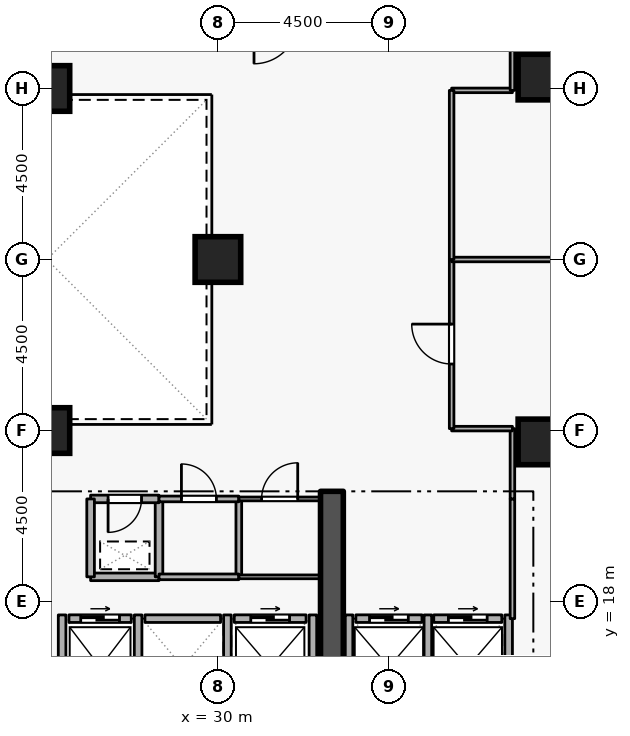
"""IFC4 building model, lengths in metres.
Left out: names, types, materials, properties, quantities, classifications, styles, units other than length and angle.
Written with IfcOpenShell. Run it as: python <this file> out.ifc"""

import sys

from ifc_helpers import new_model, si_unit, direction, frame, frame_2d, origin, origin_2d, place, context, subcontext, project, spatial, rectangle, extrude, element, fill, save


model = new_model("IFC4")
c1 = context("Model", 3, precision=1e-05, world=origin(), true_north=direction((0.0, 1.0)))
c2 = subcontext(c1, "Body", "Model", "MODEL_VIEW")
j1 = project(units=[si_unit("LENGTHUNIT", "METRE"), si_unit("PLANEANGLEUNIT", "RADIAN")], contexts=[c1])
p1 = place(None, origin())
s1 = spatial("IfcSite", under=j1, at=p1, CompositionType="ELEMENT")
p2 = place(p1, origin())
s2 = spatial("IfcBuilding", under=s1, at=p2, CompositionType="ELEMENT")
p3 = place(p2, frame((0.0, 0.0, 80.1)))
s3 = spatial("IfcBuildingStorey", under=s2, at=p3, CompositionType="ELEMENT", Elevation=80.1)
p4 = place(p3, frame((33.0, 15.2, 0.0), z_axis=(0.0, 0.0, 1.0), x_axis=(0.0, 1.0, 0.0)))
e1 = element("IfcWall", 1, at=p4, inside=s3, PredefinedType="SHEAR", context=c2, shape_type="SweptSolid", body=[
    extrude(rectangle(XDim=5.7, YDim=0.6, at=frame_2d((2.85, 0.0))), origin(), (0.0, 0.0, 1.0), 3.6),
])
for number, where, z_axis, x_axis in (
    (2, (38.5, 22.2, 0.0), (0.0, 0.0, 1.0), (1.0, 0.0, 0.0)),
    (3, (38.5, 31.8, 0.0), (0.0, 0.0, 1.0), (1.0, 0.0, 0.0)),
    (4, (25.5, 22.5, 0.0), (0.0, 0.0, 1.0), (1.0, 0.0, 0.0)),
    (5, (25.5, 31.5, 0.0), (0.0, 0.0, 1.0), (1.0, 0.0, 0.0)),
    (6, (30.0, 27.0, 0.0), (0.0, 0.0, 1.0), (1.0, 0.0, 0.0)),
):
    element("IfcColumn", number, at=place(p3, frame(where, z_axis=z_axis, x_axis=x_axis)), inside=s3, PredefinedType="COLUMN", context=c2, shape_type="SweptSolid", body=[
        extrude(rectangle(XDim=1.2, YDim=1.2, at=origin_2d()), origin(), (0.0, 0.0, 1.0), 3.6),
    ])
p5 = place(p3, frame((26.08, 17.55, 0.0), z_axis=(0.0, 0.0, 1.0), x_axis=(1.0, 0.0, 0.0)))
e7 = element("IfcWall", 7, at=p5, inside=s3, PredefinedType="STANDARD", context=c2, shape_type="SweptSolid", body=[
    extrude(rectangle(XDim=1.64, YDim=0.2, at=frame_2d((0.82, 0.0))), origin(), (0.0, 0.0, 1.0), 3.34),
])
p6 = place(p5, frame((0.31, 0.0, 0.0)))
e8 = element("IfcOpeningElement", 8, at=p6, cuts=e7, PredefinedType="OPENING", context=c2, shape_type="SweptSolid", body=[
    extrude(rectangle(XDim=1.02, YDim=2.06, at=frame_2d((0.51, 1.03))), frame((0.0, 0.11, 0.0), z_axis=(0.0, -1.0, 0.0), x_axis=(1.0, 0.0, 0.0)), (0.0, 0.0, 1.0), 0.22),
])
p7 = place(p3, frame((28.08, 17.55, 0.0), z_axis=(0.0, 0.0, 1.0), x_axis=(1.0, 0.0, 0.0)))
e9 = element("IfcWall", 9, at=p7, inside=s3, PredefinedType="STANDARD", context=c2, shape_type="SweptSolid", body=[
    extrude(rectangle(XDim=1.99, YDim=0.2, at=frame_2d((0.995, 0.0))), origin(), (0.0, 0.0, 1.0), 3.34),
])
p8 = place(p3, frame((30.43, 17.55, 0.0), z_axis=(0.0, 0.0, 1.0), x_axis=(1.0, 0.0, 0.0)))
e10 = element("IfcWall", 10, at=p8, inside=s3, PredefinedType="STANDARD", context=c2, shape_type="SweptSolid", body=[
    extrude(rectangle(XDim=1.89, YDim=0.2, at=frame_2d((0.945, 0.0))), origin(), (0.0, 0.0, 1.0), 3.34),
])
p9 = place(p8, frame((0.435, 0.0, 0.0)))
e11 = element("IfcOpeningElement", 11, at=p9, cuts=e10, PredefinedType="OPENING", context=c2, shape_type="SweptSolid", body=[
    extrude(rectangle(XDim=1.02, YDim=2.06, at=frame_2d((0.51, 1.03))), frame((0.0, 0.11, 0.0), z_axis=(0.0, -1.0, 0.0), x_axis=(1.0, 0.0, 0.0)), (0.0, 0.0, 1.0), 0.22),
])
p10 = place(p3, frame((33.63, 17.55, 0.0), z_axis=(0.0, 0.0, 1.0), x_axis=(1.0, 0.0, 0.0)))
e12 = element("IfcWall", 12, at=p10, inside=s3, PredefinedType="STANDARD", context=c2, shape_type="SweptSolid", body=[
    extrude(rectangle(XDim=1.74, YDim=0.2, at=frame_2d((0.87, 0.0))), origin(), (0.0, 0.0, 1.0), 3.34),
])
p11 = place(p10, frame((0.36, 0.0, 0.0)))
e13 = element("IfcOpeningElement", 13, at=p11, cuts=e12, PredefinedType="OPENING", context=c2, shape_type="SweptSolid", body=[
    extrude(rectangle(XDim=1.02, YDim=2.06, at=frame_2d((0.51, 1.03))), frame((0.0, 0.11, 0.0), z_axis=(0.0, -1.0, 0.0), x_axis=(1.0, 0.0, 0.0)), (0.0, 0.0, 1.0), 0.22),
])
p12 = place(p3, frame((35.68, 17.55, 0.0), z_axis=(0.0, 0.0, 1.0), x_axis=(1.0, 0.0, 0.0)))
e14 = element("IfcWall", 14, at=p12, inside=s3, PredefinedType="STANDARD", context=c2, shape_type="SweptSolid", body=[
    extrude(rectangle(XDim=1.79, YDim=0.2, at=frame_2d((0.895, 0.0))), origin(), (0.0, 0.0, 1.0), 3.34),
])
p13 = place(p12, frame((0.385, 0.0, 0.0)))
e15 = element("IfcOpeningElement", 15, at=p13, cuts=e14, PredefinedType="OPENING", context=c2, shape_type="SweptSolid", body=[
    extrude(rectangle(XDim=1.02, YDim=2.06, at=frame_2d((0.51, 1.03))), frame((0.0, 0.11, 0.0), z_axis=(0.0, -1.0, 0.0), x_axis=(1.0, 0.0, 0.0)), (0.0, 0.0, 1.0), 0.22),
])
for number, where, z_axis, x_axis in (
    (16, (27.9, 15.212, 0.0), (0.0, 0.0, 1.0), (0.0, 1.0, 0.0)),
    (17, (25.9, 15.212, 0.0), (0.0, 0.0, 1.0), (0.0, 1.0, 0.0)),
    (18, (30.25, 15.212, 0.0), (0.0, 0.0, 1.0), (0.0, 1.0, 0.0)),
    (19, (32.5, 15.212, 0.0), (0.0, 0.0, 1.0), (0.0, 1.0, 0.0)),
):
    element("IfcWall", number, at=place(p3, frame(where, z_axis=z_axis, x_axis=x_axis)), inside=s3, PredefinedType="STANDARD", context=c2, shape_type="SweptSolid", body=[
        extrude(rectangle(XDim=2.436, YDim=0.2, at=frame_2d((1.218, 0.0))), origin(), (0.0, 0.0, 1.0), 3.34),
    ])
for number, where, z_axis, x_axis in (
    (20, (35.525, 15.012, 0.0), (0.0, 0.0, 1.0), (0.0, 1.0, 0.0)),
    (21, (33.45, 15.012, 0.0), (0.0, 0.0, 1.0), (0.0, 1.0, 0.0)),
    (22, (37.65, 15.012, 0.0), (0.0, 0.0, 1.0), (0.0, 1.0, 0.0)),
):
    element("IfcWall", number, at=place(p3, frame(where, z_axis=z_axis, x_axis=x_axis)), inside=s3, PredefinedType="STANDARD", context=c2, shape_type="SweptSolid", body=[
        extrude(rectangle(XDim=2.636, YDim=0.2, at=frame_2d((1.318, 0.0))), origin(), (0.0, 0.0, 1.0), 3.34),
    ])
p14 = place(p3, frame((26.65, 18.65, 0.0), z_axis=(0.0, 0.0, 1.0), x_axis=(1.0, 0.0, 0.0)))
e23 = element("IfcWall", 23, at=p14, inside=s3, PredefinedType="STANDARD", context=c2, shape_type="SweptSolid", body=[
    extrude(rectangle(XDim=1.8, YDim=0.2, at=frame_2d((0.9, 0.0))), origin(), (0.0, 0.0, 1.0), 3.34),
])
p15 = place(p3, frame((28.45, 18.65, 0.0), z_axis=(0.0, 0.0, 1.0), x_axis=(0.0, 1.0, 0.0)))
e24 = element("IfcWall", 24, at=p15, inside=s3, PredefinedType="STANDARD", context=c2, shape_type="SweptSolid", body=[
    extrude(rectangle(XDim=2.05, YDim=0.2, at=frame_2d((1.025, 0.0))), origin(), (0.0, 0.0, 1.0), 3.34),
])
p16 = place(p3, frame((28.45, 20.7, 0.0), z_axis=(0.0, 0.0, 1.0), x_axis=(-1.0, 0.0, 0.0)))
e25 = element("IfcWall", 25, at=p16, inside=s3, PredefinedType="STANDARD", context=c2, shape_type="SweptSolid", body=[
    extrude(rectangle(XDim=1.8, YDim=0.2, at=frame_2d((0.9, 0.0))), origin(), (0.0, 0.0, 1.0), 3.34),
])
p17 = place(p16, frame((0.46, 0.0, 0.0)))
e26 = element("IfcOpeningElement", 26, at=p17, cuts=e25, PredefinedType="OPENING", context=c2, shape_type="SweptSolid", body=[
    extrude(rectangle(XDim=0.88, YDim=2.04, at=frame_2d((0.44, 1.02))), frame((0.0, 0.11, 0.0), z_axis=(0.0, -1.0, 0.0), x_axis=(1.0, 0.0, 0.0)), (0.0, 0.0, 1.0), 0.22),
])
p18 = place(p3, frame((26.65, 20.7, 0.0), z_axis=(0.0, 0.0, 1.0), x_axis=(0.0, -1.0, 0.0)))
e27 = element("IfcWall", 27, at=p18, inside=s3, PredefinedType="STANDARD", context=c2, shape_type="SweptSolid", body=[
    extrude(rectangle(XDim=2.05, YDim=0.2, at=frame_2d((1.025, 0.0))), origin(), (0.0, 0.0, 1.0), 3.34),
])
p19 = place(p3, frame((30.55, 20.7, 0.0), z_axis=(0.0, 0.0, 1.0), x_axis=(0.0, -1.0, 0.0)))
e28 = element("IfcWall", 28, at=p19, inside=s3, PredefinedType="PARTITIONING", context=c2, shape_type="SweptSolid", body=[
    extrude(rectangle(XDim=2.05, YDim=0.15, at=frame_2d((1.025, 0.0))), origin(), (0.0, 0.0, 1.0), 3.34),
])
p20 = place(p3, frame((30.55, 18.65, 0.0), z_axis=(0.0, 0.0, 1.0), x_axis=(-1.0, 0.0, 0.0)))
e29 = element("IfcWall", 29, at=p20, inside=s3, PredefinedType="PARTITIONING", context=c2, shape_type="SweptSolid", body=[
    extrude(rectangle(XDim=2.1, YDim=0.15, at=frame_2d((1.05, 0.0))), origin(), (0.0, 0.0, 1.0), 3.34),
])
p21 = place(p3, frame((28.45, 20.7, 0.0), z_axis=(0.0, 0.0, 1.0), x_axis=(1.0, 0.0, 0.0)))
e30 = element("IfcWall", 30, at=p21, inside=s3, PredefinedType="PARTITIONING", context=c2, shape_type="SweptSolid", body=[
    extrude(rectangle(XDim=2.1, YDim=0.15, at=frame_2d((1.05, 0.0))), origin(), (0.0, 0.0, 1.0), 3.34),
])
p22 = place(p21, frame((0.59, 0.0, 0.0)))
e31 = element("IfcOpeningElement", 31, at=p22, cuts=e30, PredefinedType="OPENING", context=c2, shape_type="SweptSolid", body=[
    extrude(rectangle(XDim=0.92, YDim=2.08, at=frame_2d((0.46, 1.04))), frame((0.0, 0.085, 0.0), z_axis=(0.0, -1.0, 0.0), x_axis=(1.0, 0.0, 0.0)), (0.0, 0.0, 1.0), 0.17),
])
p23 = place(p3, frame((32.7, 18.65, 0.0), z_axis=(0.0, 0.0, 1.0), x_axis=(-1.0, 0.0, 0.0)))
e32 = element("IfcWall", 32, at=p23, inside=s3, PredefinedType="PARTITIONING", context=c2, shape_type="SweptSolid", body=[
    extrude(rectangle(XDim=2.15, YDim=0.1, at=frame_2d((1.075, 0.0))), origin(), (0.0, 0.0, 1.0), 3.34),
])
p24 = place(p3, frame((30.55, 20.7, 0.0), z_axis=(0.0, 0.0, 1.0), x_axis=(1.0, 0.0, 0.0)))
e33 = element("IfcWall", 33, at=p24, inside=s3, PredefinedType="PARTITIONING", context=c2, shape_type="SweptSolid", body=[
    extrude(rectangle(XDim=2.15, YDim=0.1, at=frame_2d((1.075, 0.0))), origin(), (0.0, 0.0, 1.0), 3.34),
])
p25 = place(p24, frame((0.6, 0.0, 0.0)))
e34 = element("IfcOpeningElement", 34, at=p25, cuts=e33, PredefinedType="OPENING", context=c2, shape_type="SweptSolid", body=[
    extrude(rectangle(XDim=0.95, YDim=2.1, at=frame_2d((0.475, 1.05))), frame((0.0, 0.06, 0.0), z_axis=(0.0, -1.0, 0.0), x_axis=(1.0, 0.0, 0.0)), (0.0, 0.0, 1.0), 0.12),
])
p26 = place(p3, frame((37.75, 17.55, 0.0), z_axis=(0.0, 0.0, 1.0), x_axis=(0.0, 1.0, 0.0)))
e35 = element("IfcWall", 35, at=p26, inside=s3, PredefinedType="PARTITIONING", context=c2, shape_type="SweptSolid", body=[
    extrude(rectangle(XDim=3.15, YDim=0.12, at=frame_2d((1.575, 0.0))), origin(), (0.0, 0.0, 1.0), 3.34),
])
p27 = place(p3, frame((37.75, 20.7, 0.0), z_axis=(0.0, 0.0, 1.0), x_axis=(0.0, 1.0, 0.0)))
e36 = element("IfcWall", 36, at=p27, inside=s3, PredefinedType="PARTITIONING", context=c2, shape_type="SweptSolid", body=[
    extrude(rectangle(XDim=1.85, YDim=0.12, at=frame_2d((0.925, 0.0))), origin(), (0.0, 0.0, 1.0), 3.34),
])
p28 = place(p3, frame((37.75, 22.55, 0.0), z_axis=(0.0, 0.0, 1.0), x_axis=(-1.0, 0.0, 0.0)))
e37 = element("IfcWall", 37, at=p28, inside=s3, PredefinedType="PARTITIONING", context=c2, shape_type="SweptSolid", body=[
    extrude(rectangle(XDim=1.6, YDim=0.12, at=frame_2d((0.8, 0.0))), origin(), (0.0, 0.0, 1.0), 3.34),
])
p29 = place(p3, frame((36.15, 22.55, 0.0), z_axis=(0.0, 0.0, 1.0), x_axis=(0.0, 1.0, 0.0)))
e38 = element("IfcWall", 38, at=p29, inside=s3, PredefinedType="PARTITIONING", context=c2, shape_type="SweptSolid", body=[
    extrude(rectangle(XDim=4.45, YDim=0.12, at=frame_2d((2.225, 0.0))), origin(), (0.0, 0.0, 1.0), 3.34),
])
p30 = place(p29, frame((1.7, 0.0, 0.0)))
e39 = element("IfcOpeningElement", 39, at=p30, cuts=e38, PredefinedType="OPENING", context=c2, shape_type="SweptSolid", body=[
    extrude(rectangle(XDim=1.05, YDim=2.1, at=frame_2d((0.525, 1.05))), frame((0.0, 0.07, 0.0), z_axis=(0.0, -1.0, 0.0), x_axis=(1.0, 0.0, 0.0)), (0.0, 0.0, 1.0), 0.14),
])
p31 = place(p3, frame((36.15, 27.0, 0.0), z_axis=(0.0, 0.0, 1.0), x_axis=(1.0, 0.0, 0.0)))
e40 = element("IfcWall", 40, at=p31, inside=s3, PredefinedType="PARTITIONING", context=c2, shape_type="SweptSolid", body=[
    extrude(rectangle(XDim=13.27, YDim=0.12, at=frame_2d((6.635, 0.0))), origin(), (0.0, 0.0, 1.0), 2.882),
])
p32 = place(p3, frame((36.15, 31.45, 0.0), z_axis=(0.0, 0.0, 1.0), x_axis=(1.0, 0.0, 0.0)))
e41 = element("IfcWall", 41, at=p32, inside=s3, PredefinedType="PARTITIONING", context=c2, shape_type="SweptSolid", body=[
    extrude(rectangle(XDim=1.6, YDim=0.12, at=frame_2d((0.8, 0.0))), origin(), (0.0, 0.0, 1.0), 3.34),
])
p33 = place(p3, frame((37.75, 31.45, 0.0), z_axis=(0.0, 0.0, 1.0), x_axis=(0.0, 1.0, 0.0)))
e42 = element("IfcWall", 42, at=p33, inside=s3, PredefinedType="PARTITIONING", context=c2, shape_type="SweptSolid", body=[
    extrude(rectangle(XDim=1.85, YDim=0.12, at=frame_2d((0.925, 0.0))), origin(), (0.0, 0.0, 1.0), 3.34),
])
p34 = place(p3, frame((36.15, 27.0, 0.0), z_axis=(0.0, 0.0, 1.0), x_axis=(0.0, 1.0, 0.0)))
e43 = element("IfcWall", 43, at=p34, inside=s3, PredefinedType="PARTITIONING", context=c2, shape_type="SweptSolid", body=[
    extrude(rectangle(XDim=4.45, YDim=0.12, at=frame_2d((2.225, 0.0))), origin(), (0.0, 0.0, 1.0), 3.34),
])
p35 = place(p6, origin())
e44 = element("IfcDoor", 44, at=p35, inside=s3, OperationType="SLIDING_TO_LEFT", PredefinedType="DOOR", context=c2, shape_type="SweptSolid", body=[
    extrude(rectangle(XDim=1.02, YDim=2.06, at=frame_2d((0.51, 1.03))), frame((0.0, 0.025, 0.0), z_axis=(0.0, -1.0, 0.0), x_axis=(1.0, 0.0, 0.0)), (0.0, 0.0, 1.0), 0.05),
])
fill(e8, e44)
p36 = place(p9, origin())
e45 = element("IfcDoor", 45, at=p36, inside=s3, OperationType="SLIDING_TO_LEFT", PredefinedType="DOOR", context=c2, shape_type="SweptSolid", body=[
    extrude(rectangle(XDim=1.02, YDim=2.06, at=frame_2d((0.51, 1.03))), frame((0.0, 0.025, 0.0), z_axis=(0.0, -1.0, 0.0), x_axis=(1.0, 0.0, 0.0)), (0.0, 0.0, 1.0), 0.05),
])
fill(e11, e45)
p37 = place(p11, origin())
e46 = element("IfcDoor", 46, at=p37, inside=s3, OperationType="SLIDING_TO_LEFT", PredefinedType="DOOR", context=c2, shape_type="SweptSolid", body=[
    extrude(rectangle(XDim=1.02, YDim=2.06, at=frame_2d((0.51, 1.03))), frame((0.0, 0.025, 0.0), z_axis=(0.0, -1.0, 0.0), x_axis=(1.0, 0.0, 0.0)), (0.0, 0.0, 1.0), 0.05),
])
fill(e13, e46)
p38 = place(p13, origin())
e47 = element("IfcDoor", 47, at=p38, inside=s3, OperationType="SLIDING_TO_LEFT", PredefinedType="DOOR", context=c2, shape_type="SweptSolid", body=[
    extrude(rectangle(XDim=1.02, YDim=2.06, at=frame_2d((0.51, 1.03))), frame((0.0, 0.025, 0.0), z_axis=(0.0, -1.0, 0.0), x_axis=(1.0, 0.0, 0.0)), (0.0, 0.0, 1.0), 0.05),
])
fill(e15, e47)
p39 = place(p17, origin())
e48 = element("IfcDoor", 48, at=p39, inside=s3, OperationType="SINGLE_SWING_RIGHT", PredefinedType="DOOR", context=c2, shape_type="SweptSolid", body=[
    extrude(rectangle(XDim=0.88, YDim=2.04, at=frame_2d((0.44, 1.02))), frame((0.0, 0.025, 0.0), z_axis=(0.0, -1.0, 0.0), x_axis=(1.0, 0.0, 0.0)), (0.0, 0.0, 1.0), 0.05),
])
fill(e26, e48)
p40 = place(p22, origin())
e49 = element("IfcDoor", 49, at=p40, inside=s3, OperationType="SINGLE_SWING_LEFT", PredefinedType="DOOR", context=c2, shape_type="SweptSolid", body=[
    extrude(rectangle(XDim=0.92, YDim=2.08, at=frame_2d((0.46, 1.04))), frame((0.0, 0.025, 0.0), z_axis=(0.0, -1.0, 0.0), x_axis=(1.0, 0.0, 0.0)), (0.0, 0.0, 1.0), 0.05),
])
fill(e31, e49)
p41 = place(p25, origin())
e50 = element("IfcDoor", 50, at=p41, inside=s3, OperationType="SINGLE_SWING_RIGHT", PredefinedType="DOOR", context=c2, shape_type="SweptSolid", body=[
    extrude(rectangle(XDim=0.95, YDim=2.1, at=frame_2d((0.475, 1.05))), frame((0.0, 0.025, 0.0), z_axis=(0.0, -1.0, 0.0), x_axis=(1.0, 0.0, 0.0)), (0.0, 0.0, 1.0), 0.05),
])
fill(e34, e50)
p42 = place(p30, origin())
e51 = element("IfcDoor", 51, at=p42, inside=s3, OperationType="SINGLE_SWING_RIGHT", PredefinedType="DOOR", context=c2, shape_type="SweptSolid", body=[
    extrude(rectangle(XDim=1.05, YDim=2.1, at=frame_2d((0.525, 1.05))), frame((0.0, 0.025, 0.0), z_axis=(0.0, -1.0, 0.0), x_axis=(1.0, 0.0, 0.0)), (0.0, 0.0, 1.0), 0.05),
])
fill(e39, e51)
save(model, sys.argv[1])
